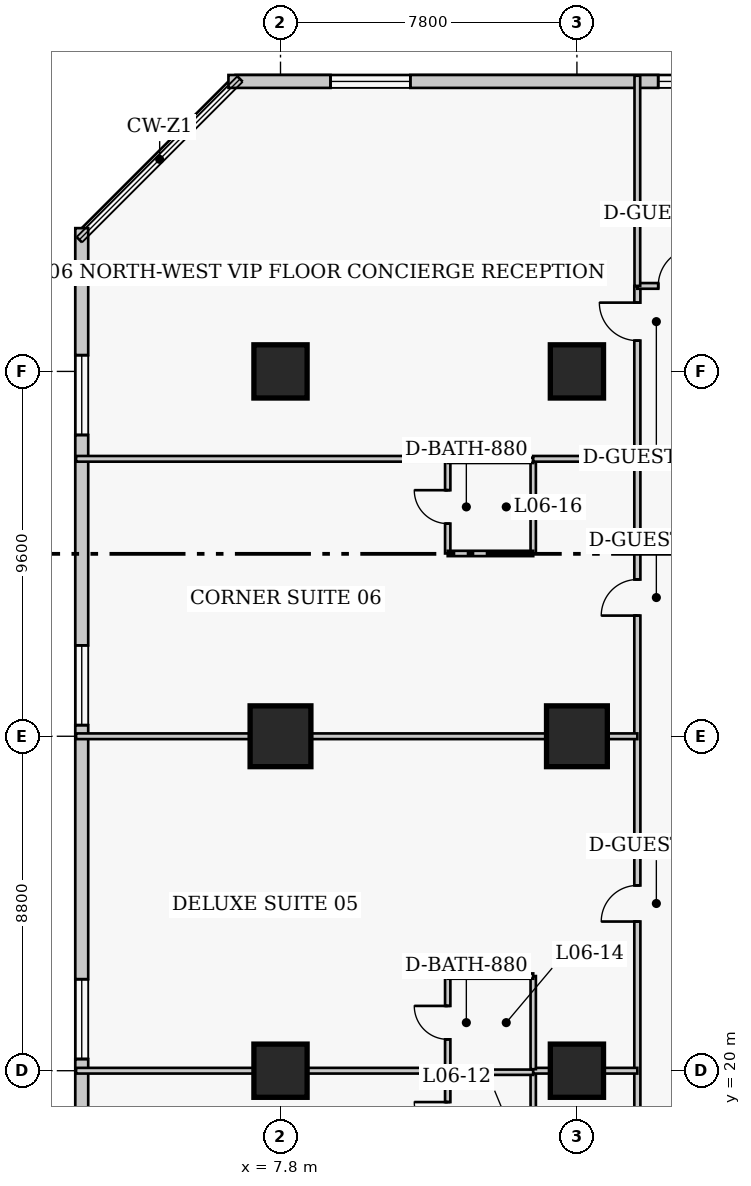
"""IFC4 building model, lengths in metres.
Left out: names, types, materials, properties, quantities, classifications, styles, units other than length and angle.
Written with IfcOpenShell. Run it as: python <this file> out.ifc"""

import sys

from ifc_helpers import new_model, si_unit, direction, frame, frame_2d, origin, origin_2d, place, context, subcontext, project, spatial, rectangle, extrude, element, fill, save


model = new_model("IFC4")
c1 = context("Model", 3, precision=1e-05, world=origin(), true_north=direction((0.0, 1.0)))
c2 = subcontext(c1, "Body", "Model", "MODEL_VIEW")
j1 = project(units=[si_unit("LENGTHUNIT", "METRE"), si_unit("PLANEANGLEUNIT", "RADIAN")], contexts=[c1])
p1 = place(None, origin())
s1 = spatial("IfcSite", under=j1, at=p1, CompositionType="ELEMENT")
p2 = place(p1, origin())
s2 = spatial("IfcBuilding", under=s1, at=p2, CompositionType="ELEMENT")
p3 = place(p2, frame((0.0, 0.0, 29.8)))
s3 = spatial("IfcBuildingStorey", under=s2, at=p3, CompositionType="ELEMENT", Elevation=29.8)
p4 = place(p3, frame((7.8, 20.0, 0.0), z_axis=(0.0, 0.0, 1.0), x_axis=(1.0, 0.0, 0.0)))
e1 = element("IfcColumn", 1, at=p4, inside=s3, PredefinedType="COLUMN", context=c2, shape_type="SweptSolid", body=[
    extrude(rectangle(XDim=1.4, YDim=1.4, at=origin_2d()), origin(), (0.0, 0.0, 1.0), 3.8),
])
p5 = place(p3, frame((7.8, 28.8, 0.0), z_axis=(0.0, 0.0, 1.0), x_axis=(1.0, 0.0, 0.0)))
e2 = element("IfcColumn", 2, at=p5, inside=s3, PredefinedType="COLUMN", context=c2, shape_type="SweptSolid", body=[
    extrude(rectangle(XDim=1.6, YDim=1.6, at=origin_2d()), origin(), (0.0, 0.0, 1.0), 3.8),
])
for number, where, z_axis, x_axis in (
    (3, (7.8, 38.4, 0.0), (0.0, 0.0, 1.0), (1.0, 0.0, 0.0)),
    (4, (15.6, 20.0, 0.0), (0.0, 0.0, 1.0), (1.0, 0.0, 0.0)),
):
    element("IfcColumn", number, at=place(p3, frame(where, z_axis=z_axis, x_axis=x_axis)), inside=s3, PredefinedType="COLUMN", context=c2, shape_type="SweptSolid", body=[
        extrude(rectangle(XDim=1.4, YDim=1.4, at=origin_2d()), origin(), (0.0, 0.0, 1.0), 3.8),
    ])
p6 = place(p3, frame((15.6, 28.8, 0.0), z_axis=(0.0, 0.0, 1.0), x_axis=(1.0, 0.0, 0.0)))
e5 = element("IfcColumn", 5, at=p6, inside=s3, PredefinedType="COLUMN", context=c2, shape_type="SweptSolid", body=[
    extrude(rectangle(XDim=1.6, YDim=1.6, at=origin_2d()), origin(), (0.0, 0.0, 1.0), 3.8),
])
p7 = place(p3, frame((15.6, 38.4, 0.0), z_axis=(0.0, 0.0, 1.0), x_axis=(1.0, 0.0, 0.0)))
e6 = element("IfcColumn", 6, at=p7, inside=s3, PredefinedType="COLUMN", context=c2, shape_type="SweptSolid", body=[
    extrude(rectangle(XDim=1.4, YDim=1.4, at=origin_2d()), origin(), (0.0, 0.0, 1.0), 3.8),
])
p8 = place(p3, frame((36.32, 46.03, 0.0), z_axis=(0.0, 0.0, 1.0), x_axis=(-1.0, 0.0, 0.0)))
e7 = element("IfcWall", 7, at=p8, inside=s3, PredefinedType="SOLIDWALL", context=c2, shape_type="SweptSolid", body=[
    extrude(rectangle(XDim=29.89, YDim=0.34, at=frame_2d((14.945, 0.0))), origin(), (0.0, 0.0, 1.0), 3.54),
])
p9 = place(p8, frame((2.686, 0.0, 0.85)))
e8 = element("IfcOpeningElement", 8, at=p9, cuts=e7, PredefinedType="OPENING", context=c2, shape_type="SweptSolid", body=[
    extrude(rectangle(XDim=2.1, YDim=1.85, at=frame_2d((1.05, 0.925))), frame((0.0, 0.18, 0.0), z_axis=(0.0, -1.0, 0.0), x_axis=(1.0, 0.0, 0.0)), (0.0, 0.0, 1.0), 0.36),
])
p10 = place(p8, frame((10.159, 0.0, 0.85)))
e9 = element("IfcOpeningElement", 9, at=p10, cuts=e7, PredefinedType="OPENING", context=c2, shape_type="SweptSolid", body=[
    extrude(rectangle(XDim=2.1, YDim=1.85, at=frame_2d((1.05, 0.925))), frame((0.0, 0.18, 0.0), z_axis=(0.0, -1.0, 0.0), x_axis=(1.0, 0.0, 0.0)), (0.0, 0.0, 1.0), 0.36),
])
p11 = place(p8, frame((16.481, 0.0, 0.85)))
e10 = element("IfcOpeningElement", 10, at=p11, cuts=e7, PredefinedType="OPENING", context=c2, shape_type="SweptSolid", body=[
    extrude(rectangle(XDim=2.1, YDim=1.85, at=frame_2d((1.05, 0.925))), frame((0.0, 0.18, 0.0), z_axis=(0.0, -1.0, 0.0), x_axis=(1.0, 0.0, 0.0)), (0.0, 0.0, 1.0), 0.36),
])
p12 = place(p8, frame((25.104, 0.0, 0.85)))
e11 = element("IfcOpeningElement", 11, at=p12, cuts=e7, PredefinedType="OPENING", context=c2, shape_type="SweptSolid", body=[
    extrude(rectangle(XDim=2.1, YDim=1.85, at=frame_2d((1.05, 0.925))), frame((0.0, 0.18, 0.0), z_axis=(0.0, -1.0, 0.0), x_axis=(1.0, 0.0, 0.0)), (0.0, 0.0, 1.0), 0.36),
])
p13 = place(p3, frame((2.57, 42.17, 0.0), z_axis=(0.0, 0.0, 1.0), x_axis=(0.0, -1.0, 0.0)))
e12 = element("IfcWall", 12, at=p13, inside=s3, PredefinedType="SOLIDWALL", context=c2, shape_type="SweptSolid", body=[
    extrude(rectangle(XDim=35.14, YDim=0.34, at=frame_2d((17.57, 0.0))), origin(), (0.0, 0.0, 1.0), 3.54),
])
p14 = place(p13, frame((3.343, 0.0, 0.85)))
e13 = element("IfcOpeningElement", 13, at=p14, cuts=e12, PredefinedType="OPENING", context=c2, shape_type="SweptSolid", body=[
    extrude(rectangle(XDim=2.1, YDim=1.85, at=frame_2d((1.05, 0.925))), frame((0.0, 0.18, 0.0), z_axis=(0.0, -1.0, 0.0), x_axis=(1.0, 0.0, 0.0)), (0.0, 0.0, 1.0), 0.36),
])
p15 = place(p13, frame((10.978, 0.0, 0.85)))
e14 = element("IfcOpeningElement", 14, at=p15, cuts=e12, PredefinedType="OPENING", context=c2, shape_type="SweptSolid", body=[
    extrude(rectangle(XDim=2.1, YDim=1.85, at=frame_2d((1.05, 0.925))), frame((0.0, 0.18, 0.0), z_axis=(0.0, -1.0, 0.0), x_axis=(1.0, 0.0, 0.0)), (0.0, 0.0, 1.0), 0.36),
])
p16 = place(p13, frame((19.762, 0.0, 0.85)))
e15 = element("IfcOpeningElement", 15, at=p16, cuts=e12, PredefinedType="OPENING", context=c2, shape_type="SweptSolid", body=[
    extrude(rectangle(XDim=2.1, YDim=1.85, at=frame_2d((1.05, 0.925))), frame((0.0, 0.18, 0.0), z_axis=(0.0, -1.0, 0.0), x_axis=(1.0, 0.0, 0.0)), (0.0, 0.0, 1.0), 0.36),
])
p17 = place(p13, frame((28.548, 0.0, 0.85)))
e16 = element("IfcOpeningElement", 16, at=p17, cuts=e12, PredefinedType="OPENING", context=c2, shape_type="SweptSolid", body=[
    extrude(rectangle(XDim=2.1, YDim=1.85, at=frame_2d((1.05, 0.925))), frame((0.0, 0.18, 0.0), z_axis=(0.0, -1.0, 0.0), x_axis=(1.0, 0.0, 0.0)), (0.0, 0.0, 1.0), 0.36),
])
p18 = place(p3, frame((17.19, 5.05, 0.0), z_axis=(0.0, 0.0, 1.0), x_axis=(0.0, 1.0, 0.0)))
e17 = element("IfcWall", 17, at=p18, inside=s3, PredefinedType="PARTITIONING", context=c2, shape_type="SweptSolid", body=[
    extrude(rectangle(XDim=35.6, YDim=0.16, at=frame_2d((17.8, 0.0))), origin(), (0.0, 0.0, 1.0), 3.54),
])
p19 = place(p18, frame((2.6, 0.0, 0.0)))
e18 = element("IfcOpeningElement", 18, at=p19, cuts=e17, PredefinedType="OPENING", context=c2, shape_type="SweptSolid", body=[
    extrude(rectangle(XDim=0.95, YDim=2.1, at=frame_2d((0.475, 1.05))), frame((0.0, 0.09, 0.0), z_axis=(0.0, -1.0, 0.0), x_axis=(1.0, 0.0, 0.0)), (0.0, 0.0, 1.0), 0.18),
])
p20 = place(p18, frame((10.075, 0.0, 0.0)))
e19 = element("IfcOpeningElement", 19, at=p20, cuts=e17, PredefinedType="OPENING", context=c2, shape_type="SweptSolid", body=[
    extrude(rectangle(XDim=0.95, YDim=2.1, at=frame_2d((0.475, 1.05))), frame((0.0, 0.09, 0.0), z_axis=(0.0, -1.0, 0.0), x_axis=(1.0, 0.0, 0.0)), (0.0, 0.0, 1.0), 0.18),
])
p21 = place(p18, frame((18.875, 0.0, 0.0)))
e20 = element("IfcOpeningElement", 20, at=p21, cuts=e17, PredefinedType="OPENING", context=c2, shape_type="SweptSolid", body=[
    extrude(rectangle(XDim=0.95, YDim=2.1, at=frame_2d((0.475, 1.05))), frame((0.0, 0.09, 0.0), z_axis=(0.0, -1.0, 0.0), x_axis=(1.0, 0.0, 0.0)), (0.0, 0.0, 1.0), 0.18),
])
p22 = place(p18, frame((26.925, 0.0, 0.0)))
e21 = element("IfcOpeningElement", 21, at=p22, cuts=e17, PredefinedType="OPENING", context=c2, shape_type="SweptSolid", body=[
    extrude(rectangle(XDim=0.95, YDim=2.1, at=frame_2d((0.475, 1.05))), frame((0.0, 0.09, 0.0), z_axis=(0.0, -1.0, 0.0), x_axis=(1.0, 0.0, 0.0)), (0.0, 0.0, 1.0), 0.18),
])
p23 = place(p18, frame((34.16, 0.0, 0.0)))
e22 = element("IfcOpeningElement", 22, at=p23, cuts=e17, PredefinedType="OPENING", context=c2, shape_type="SweptSolid", body=[
    extrude(rectangle(XDim=1.0, YDim=2.15, at=frame_2d((0.5, 1.075))), frame((0.0, 0.09, 0.0), z_axis=(0.0, -1.0, 0.0), x_axis=(1.0, 0.0, 0.0)), (0.0, 0.0, 1.0), 0.18),
])
p24 = place(p3, frame((17.19, 40.65, 0.0), z_axis=(0.0, 0.0, 1.0), x_axis=(1.0, 0.0, 0.0)))
e23 = element("IfcWall", 23, at=p24, inside=s3, PredefinedType="PARTITIONING", context=c2, shape_type="SweptSolid", body=[
    extrude(rectangle(XDim=4.91, YDim=0.15, at=frame_2d((2.455, 0.0))), origin(), (0.0, 0.0, 1.0), 3.54),
])
p25 = place(p24, frame((0.55, 0.0, 0.0)))
e24 = element("IfcOpeningElement", 24, at=p25, cuts=e23, PredefinedType="OPENING", context=c2, shape_type="SweptSolid", body=[
    extrude(rectangle(XDim=1.0, YDim=2.15, at=frame_2d((0.5, 1.075))), frame((0.0, 0.085, 0.0), z_axis=(0.0, -1.0, 0.0), x_axis=(1.0, 0.0, 0.0)), (0.0, 0.0, 1.0), 0.17),
])
p26 = place(p3, frame((17.19, 40.65, 0.0), z_axis=(0.0, 0.0, 1.0), x_axis=(0.0, 1.0, 0.0)))
e25 = element("IfcWall", 25, at=p26, inside=s3, PredefinedType="PARTITIONING", context=c2, shape_type="SweptSolid", body=[
    extrude(rectangle(XDim=5.53, YDim=0.15, at=frame_2d((2.765, 0.0))), origin(), (0.0, 0.0, 1.0), 3.54),
])
p27 = place(p3, frame((12.2, 17.51, 0.0), z_axis=(0.0, 0.0, 1.0), x_axis=(0.0, 1.0, 0.0)))
e26 = element("IfcWall", 26, at=p27, inside=s3, PredefinedType="PLUMBINGWALL", context=c2, shape_type="SweptSolid", body=[
    extrude(rectangle(XDim=2.45, YDim=0.14, at=frame_2d((1.225, 0.0))), origin(), (0.0, 0.0, 1.0), 3.54),
])
p28 = place(p27, frame((0.785, 0.0, 0.0)))
e27 = element("IfcOpeningElement", 27, at=p28, cuts=e26, PredefinedType="OPENING", context=c2, shape_type="SweptSolid", body=[
    extrude(rectangle(XDim=0.88, YDim=2.05, at=frame_2d((0.44, 1.025))), frame((0.0, 0.08, 0.0), z_axis=(0.0, -1.0, 0.0), x_axis=(1.0, 0.0, 0.0)), (0.0, 0.0, 1.0), 0.16),
])
p29 = place(p3, frame((14.45, 17.51, 0.0), z_axis=(0.0, 0.0, 1.0), x_axis=(0.0, 1.0, 0.0)))
e28 = element("IfcWall", 28, at=p29, inside=s3, PredefinedType="PLUMBINGWALL", context=c2, shape_type="SweptSolid", body=[
    extrude(rectangle(XDim=2.45, YDim=0.14, at=frame_2d((1.225, 0.0))), origin(), (0.0, 0.0, 1.0), 3.54),
])
p30 = place(p3, frame((12.2, 19.96, 0.0), z_axis=(0.0, 0.0, 1.0), x_axis=(1.0, 0.0, 0.0)))
e29 = element("IfcWall", 29, at=p30, inside=s3, PredefinedType="PLUMBINGWALL", context=c2, shape_type="SweptSolid", body=[
    extrude(rectangle(XDim=2.25, YDim=0.14, at=frame_2d((1.125, 0.0))), origin(), (0.0, 0.0, 1.0), 2.593),
])
p31 = place(p3, frame((2.42, 20.0, 0.0), z_axis=(0.0, 0.0, 1.0), x_axis=(1.0, 0.0, 0.0)))
e30 = element("IfcWall", 30, at=p31, inside=s3, PredefinedType="PARTITIONING", context=c2, shape_type="SweptSolid", body=[
    extrude(rectangle(XDim=9.78, YDim=0.15, at=frame_2d((4.89, 0.0))), origin(), (0.0, 0.0, 1.0), 2.593),
])
p32 = place(p3, frame((14.45, 20.0, 0.0), z_axis=(0.0, 0.0, 1.0), x_axis=(1.0, 0.0, 0.0)))
e31 = element("IfcWall", 31, at=p32, inside=s3, PredefinedType="PARTITIONING", context=c2, shape_type="SweptSolid", body=[
    extrude(rectangle(XDim=2.74, YDim=0.15, at=frame_2d((1.37, 0.0))), origin(), (0.0, 0.0, 1.0), 2.593),
])
p33 = place(p3, frame((12.2, 20.04, 0.0), z_axis=(0.0, 0.0, 1.0), x_axis=(0.0, 1.0, 0.0)))
e32 = element("IfcWall", 32, at=p33, inside=s3, PredefinedType="PLUMBINGWALL", context=c2, shape_type="SweptSolid", body=[
    extrude(rectangle(XDim=2.45, YDim=0.14, at=frame_2d((1.225, 0.0))), origin(), (0.0, 0.0, 1.0), 3.54),
])
p34 = place(p33, frame((0.785, 0.0, 0.0)))
e33 = element("IfcOpeningElement", 33, at=p34, cuts=e32, PredefinedType="OPENING", context=c2, shape_type="SweptSolid", body=[
    extrude(rectangle(XDim=0.88, YDim=2.05, at=frame_2d((0.44, 1.025))), frame((0.0, 0.08, 0.0), z_axis=(0.0, -1.0, 0.0), x_axis=(1.0, 0.0, 0.0)), (0.0, 0.0, 1.0), 0.16),
])
p35 = place(p3, frame((14.45, 20.04, 0.0), z_axis=(0.0, 0.0, 1.0), x_axis=(0.0, 1.0, 0.0)))
e34 = element("IfcWall", 34, at=p35, inside=s3, PredefinedType="PLUMBINGWALL", context=c2, shape_type="SweptSolid", body=[
    extrude(rectangle(XDim=2.45, YDim=0.14, at=frame_2d((1.225, 0.0))), origin(), (0.0, 0.0, 1.0), 3.54),
])
p36 = place(p3, frame((12.2, 22.49, 0.0), z_axis=(0.0, 0.0, 1.0), x_axis=(1.0, 0.0, 0.0)))
e35 = element("IfcWall", 35, at=p36, inside=s3, PredefinedType="PLUMBINGWALL", context=c2, shape_type="SweptSolid", body=[
    extrude(rectangle(XDim=2.25, YDim=0.14, at=frame_2d((1.125, 0.0))), origin(), (0.0, 0.0, 1.0), 3.54),
])
p37 = place(p3, frame((2.42, 28.8, 0.0), z_axis=(0.0, 0.0, 1.0), x_axis=(1.0, 0.0, 0.0)))
e36 = element("IfcWall", 36, at=p37, inside=s3, PredefinedType="PARTITIONING", context=c2, shape_type="SweptSolid", body=[
    extrude(rectangle(XDim=14.77, YDim=0.15, at=frame_2d((7.385, 0.0))), origin(), (0.0, 0.0, 1.0), 2.593),
])
p38 = place(p3, frame((12.2, 33.61, 0.0), z_axis=(0.0, 0.0, 1.0), x_axis=(0.0, 1.0, 0.0)))
e37 = element("IfcWall", 37, at=p38, inside=s3, PredefinedType="PLUMBINGWALL", context=c2, shape_type="SweptSolid", body=[
    extrude(rectangle(XDim=2.45, YDim=0.14, at=frame_2d((1.225, 0.0))), origin(), (0.0, 0.0, 1.0), 3.54),
])
p39 = place(p38, frame((0.785, 0.0, 0.0)))
e38 = element("IfcOpeningElement", 38, at=p39, cuts=e37, PredefinedType="OPENING", context=c2, shape_type="SweptSolid", body=[
    extrude(rectangle(XDim=0.88, YDim=2.05, at=frame_2d((0.44, 1.025))), frame((0.0, 0.08, 0.0), z_axis=(0.0, -1.0, 0.0), x_axis=(1.0, 0.0, 0.0)), (0.0, 0.0, 1.0), 0.16),
])
p40 = place(p3, frame((14.45, 33.61, 0.0), z_axis=(0.0, 0.0, 1.0), x_axis=(0.0, 1.0, 0.0)))
e39 = element("IfcWall", 39, at=p40, inside=s3, PredefinedType="PLUMBINGWALL", context=c2, shape_type="SweptSolid", body=[
    extrude(rectangle(XDim=2.45, YDim=0.14, at=frame_2d((1.225, 0.0))), origin(), (0.0, 0.0, 1.0), 3.54),
])
for number, where, z_axis, x_axis in (
    (40, (12.2, 33.61, 0.0), (0.0, 0.0, 1.0), (1.0, 0.0, 0.0)),
    (41, (12.2, 36.06, 0.0), (0.0, 0.0, 1.0), (1.0, 0.0, 0.0)),
):
    element("IfcWall", number, at=place(p3, frame(where, z_axis=z_axis, x_axis=x_axis)), inside=s3, PredefinedType="PLUMBINGWALL", context=c2, shape_type="SweptSolid", body=[
        extrude(rectangle(XDim=2.25, YDim=0.14, at=frame_2d((1.125, 0.0))), origin(), (0.0, 0.0, 1.0), 3.54),
    ])
p41 = place(p3, frame((2.42, 36.1, 0.0), z_axis=(0.0, 0.0, 1.0), x_axis=(1.0, 0.0, 0.0)))
e42 = element("IfcWall", 42, at=p41, inside=s3, PredefinedType="PARTITIONING", context=c2, shape_type="SweptSolid", body=[
    extrude(rectangle(XDim=9.78, YDim=0.15, at=frame_2d((4.89, 0.0))), origin(), (0.0, 0.0, 1.0), 3.54),
])
p42 = place(p3, frame((14.45, 36.1, 0.0), z_axis=(0.0, 0.0, 1.0), x_axis=(1.0, 0.0, 0.0)))
e43 = element("IfcWall", 43, at=p42, inside=s3, PredefinedType="PARTITIONING", context=c2, shape_type="SweptSolid", body=[
    extrude(rectangle(XDim=2.74, YDim=0.15, at=frame_2d((1.37, 0.0))), origin(), (0.0, 0.0, 1.0), 3.54),
])
p43 = place(p11, origin())
e44 = element("IfcWindow", 44, at=p43, inside=s3, PartitioningType="SINGLE_PANEL", PredefinedType="WINDOW", context=c2, shape_type="SweptSolid", body=[
    extrude(rectangle(XDim=2.1, YDim=1.85, at=frame_2d((1.05, 0.925))), frame((0.0, 0.03, 0.0), z_axis=(0.0, -1.0, 0.0), x_axis=(1.0, 0.0, 0.0)), (0.0, 0.0, 1.0), 0.06),
])
fill(e10, e44)
p44 = place(p12, origin())
e45 = element("IfcWindow", 45, at=p44, inside=s3, PartitioningType="SINGLE_PANEL", PredefinedType="WINDOW", context=c2, shape_type="SweptSolid", body=[
    extrude(rectangle(XDim=2.1, YDim=1.85, at=frame_2d((1.05, 0.925))), frame((0.0, 0.03, 0.0), z_axis=(0.0, -1.0, 0.0), x_axis=(1.0, 0.0, 0.0)), (0.0, 0.0, 1.0), 0.06),
])
fill(e11, e45)
p45 = place(p14, origin())
e46 = element("IfcWindow", 46, at=p45, inside=s3, PartitioningType="SINGLE_PANEL", PredefinedType="WINDOW", context=c2, shape_type="SweptSolid", body=[
    extrude(rectangle(XDim=2.1, YDim=1.85, at=frame_2d((1.05, 0.925))), frame((0.0, 0.03, 0.0), z_axis=(0.0, -1.0, 0.0), x_axis=(1.0, 0.0, 0.0)), (0.0, 0.0, 1.0), 0.06),
])
fill(e13, e46)
p46 = place(p15, origin())
e47 = element("IfcWindow", 47, at=p46, inside=s3, PartitioningType="SINGLE_PANEL", PredefinedType="WINDOW", context=c2, shape_type="SweptSolid", body=[
    extrude(rectangle(XDim=2.1, YDim=1.85, at=frame_2d((1.05, 0.925))), frame((0.0, 0.03, 0.0), z_axis=(0.0, -1.0, 0.0), x_axis=(1.0, 0.0, 0.0)), (0.0, 0.0, 1.0), 0.06),
])
fill(e14, e47)
p47 = place(p16, origin())
e48 = element("IfcWindow", 48, at=p47, inside=s3, PartitioningType="SINGLE_PANEL", PredefinedType="WINDOW", context=c2, shape_type="SweptSolid", body=[
    extrude(rectangle(XDim=2.1, YDim=1.85, at=frame_2d((1.05, 0.925))), frame((0.0, 0.03, 0.0), z_axis=(0.0, -1.0, 0.0), x_axis=(1.0, 0.0, 0.0)), (0.0, 0.0, 1.0), 0.06),
])
fill(e15, e48)
p48 = place(p25, origin())
e49 = element("IfcDoor", 49, at=p48, inside=s3, OperationType="SINGLE_SWING_RIGHT", PredefinedType="DOOR", context=c2, shape_type="SweptSolid", body=[
    extrude(rectangle(XDim=1.0, YDim=2.15, at=frame_2d((0.5, 1.075))), frame((0.0, 0.025, 0.0), z_axis=(0.0, -1.0, 0.0), x_axis=(1.0, 0.0, 0.0)), (0.0, 0.0, 1.0), 0.05),
])
fill(e24, e49)
p49 = place(p28, origin())
e50 = element("IfcDoor", 50, at=p49, inside=s3, OperationType="SINGLE_SWING_RIGHT", PredefinedType="DOOR", context=c2, shape_type="SweptSolid", body=[
    extrude(rectangle(XDim=0.88, YDim=2.05, at=frame_2d((0.44, 1.025))), frame((0.0, 0.025, 0.0), z_axis=(0.0, -1.0, 0.0), x_axis=(1.0, 0.0, 0.0)), (0.0, 0.0, 1.0), 0.05),
])
fill(e27, e50)
p50 = place(p34, origin())
e51 = element("IfcDoor", 51, at=p50, inside=s3, OperationType="SINGLE_SWING_RIGHT", PredefinedType="DOOR", context=c2, shape_type="SweptSolid", body=[
    extrude(rectangle(XDim=0.88, YDim=2.05, at=frame_2d((0.44, 1.025))), frame((0.0, 0.025, 0.0), z_axis=(0.0, -1.0, 0.0), x_axis=(1.0, 0.0, 0.0)), (0.0, 0.0, 1.0), 0.05),
])
fill(e33, e51)
p51 = place(p21, origin())
e52 = element("IfcDoor", 52, at=p51, inside=s3, OperationType="SINGLE_SWING_LEFT", PredefinedType="DOOR", context=c2, shape_type="SweptSolid", body=[
    extrude(rectangle(XDim=0.95, YDim=2.1, at=frame_2d((0.475, 1.05))), frame((0.0, 0.025, 0.0), z_axis=(0.0, -1.0, 0.0), x_axis=(1.0, 0.0, 0.0)), (0.0, 0.0, 1.0), 0.05),
])
fill(e20, e52)
p52 = place(p39, origin())
e53 = element("IfcDoor", 53, at=p52, inside=s3, OperationType="SINGLE_SWING_RIGHT", PredefinedType="DOOR", context=c2, shape_type="SweptSolid", body=[
    extrude(rectangle(XDim=0.88, YDim=2.05, at=frame_2d((0.44, 1.025))), frame((0.0, 0.025, 0.0), z_axis=(0.0, -1.0, 0.0), x_axis=(1.0, 0.0, 0.0)), (0.0, 0.0, 1.0), 0.05),
])
fill(e38, e53)
p53 = place(p22, origin())
e54 = element("IfcDoor", 54, at=p53, inside=s3, OperationType="SINGLE_SWING_LEFT", PredefinedType="DOOR", context=c2, shape_type="SweptSolid", body=[
    extrude(rectangle(XDim=0.95, YDim=2.1, at=frame_2d((0.475, 1.05))), frame((0.0, 0.025, 0.0), z_axis=(0.0, -1.0, 0.0), x_axis=(1.0, 0.0, 0.0)), (0.0, 0.0, 1.0), 0.05),
])
fill(e21, e54)
p54 = place(p23, origin())
e55 = element("IfcDoor", 55, at=p54, inside=s3, OperationType="SINGLE_SWING_RIGHT", PredefinedType="DOOR", context=c2, shape_type="SweptSolid", body=[
    extrude(rectangle(XDim=1.0, YDim=2.15, at=frame_2d((0.5, 1.075))), frame((0.0, 0.025, 0.0), z_axis=(0.0, -1.0, 0.0), x_axis=(1.0, 0.0, 0.0)), (0.0, 0.0, 1.0), 0.05),
])
fill(e22, e55)
save(model, sys.argv[1])
